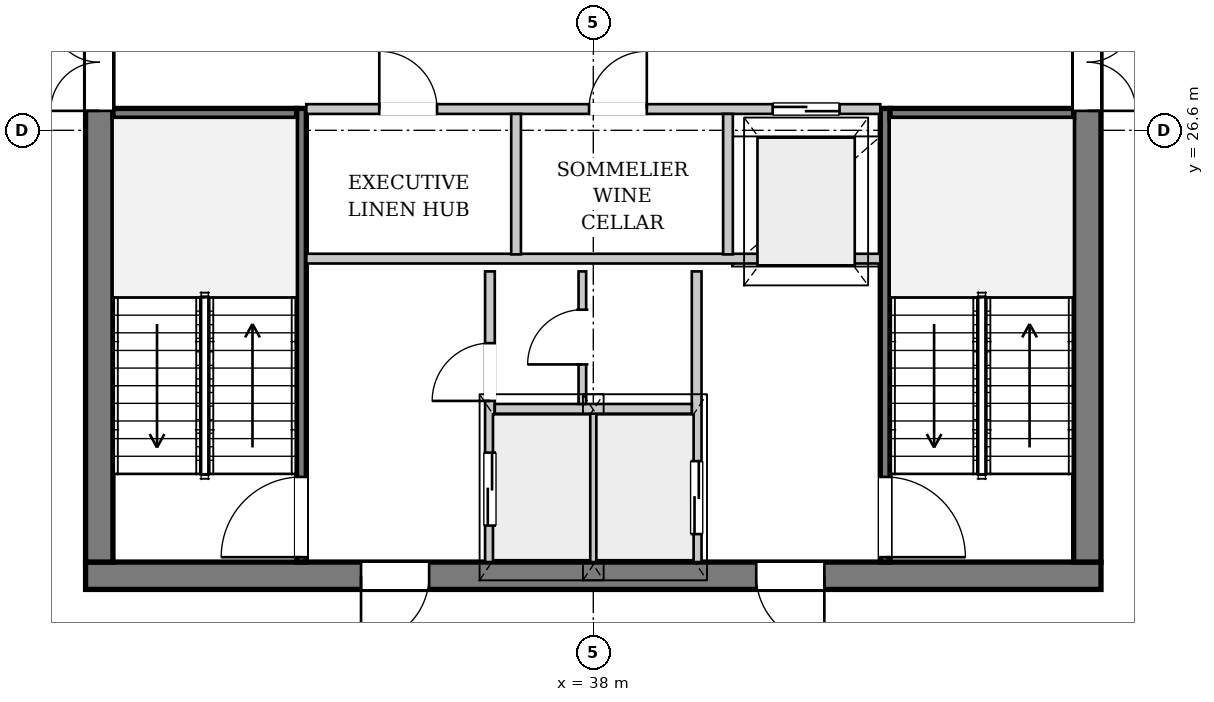
"""IFC4 building model, lengths in metres.
Left out: names, types, materials, properties, quantities, classifications, styles, units other than length and angle.
Written with IfcOpenShell. Run it as: python <this file> out.ifc"""

import sys

from ifc_helpers import new_model, si_unit, direction, frame, frame_2d, origin, place, context, subcontext, project, spatial, rectangle, extrude, source, transform, mapped, element, fill, save


model = new_model("IFC4")
c1 = context("Model", 3, precision=1e-05, world=origin(), true_north=direction((0.0, 1.0)))
c2 = subcontext(c1, "Body", "Model", "MODEL_VIEW")
j1 = project(units=[si_unit("LENGTHUNIT", "METRE"), si_unit("PLANEANGLEUNIT", "RADIAN")], contexts=[c1])
p1 = place(None, origin())
s1 = spatial("IfcSite", under=j1, at=p1, CompositionType="ELEMENT")
p2 = place(p1, origin())
s2 = spatial("IfcBuilding", under=s1, at=p2, CompositionType="ELEMENT")
p3 = place(p2, frame((0.0, 0.0, 274.1)))
s3 = spatial("IfcBuildingStorey", under=s2, at=p3, CompositionType="ELEMENT", Elevation=274.1)
p4 = place(p3, frame((51.126, 27.473, 0.0), z_axis=(0.0, 0.0, 1.0), x_axis=(-0.201040285464, -0.979582974342, 0.0)))
e1 = element("IfcWall", 1, at=p4, inside=s3, PredefinedType="SOLIDWALL", context=c2, shape_type="SweptSolid", body=[
    extrude(rectangle(XDim=22.119, YDim=0.32, at=frame_2d((11.06, 0.0))), origin(), (0.0, 0.0, 1.0), 2.812),
])
p5 = place(p4, frame((6.328, 0.0, 0.0)))
e2 = element("IfcOpeningElement", 2, at=p5, cuts=e1, PredefinedType="OPENING", context=c2, shape_type="SweptSolid", body=[
    extrude(rectangle(XDim=1.5, YDim=2.3, at=frame_2d((0.75, 1.15))), frame((0.0, 0.17, 0.0), z_axis=(0.0, -1.0, 0.0), x_axis=(1.0, 0.0, 0.0)), (0.0, 0.0, 1.0), 0.34),
])
p6 = place(p4, frame((15.268, 0.0, 0.342)))
e3 = element("IfcOpeningElement", 3, at=p6, cuts=e1, PredefinedType="OPENING", context=c2, shape_type="SweptSolid", body=[
    extrude(rectangle(XDim=2.6, YDim=2.35, at=frame_2d((1.3, 1.175))), frame((0.0, 0.17, 0.0), z_axis=(0.0, -1.0, 0.0), x_axis=(1.0, 0.0, 0.0)), (0.0, 0.0, 1.0), 0.34),
])
p7 = place(p3, frame((29.79, 13.028, 0.0), z_axis=(0.0, 0.0, 1.0), x_axis=(-0.78993873284, 0.613185778014, 0.0)))
e4 = element("IfcWall", 4, at=p7, inside=s3, PredefinedType="SOLIDWALL", context=c2, shape_type="SweptSolid", body=[
    extrude(rectangle(XDim=17.226, YDim=0.32, at=frame_2d((8.613, 0.0))), origin(), (0.0, 0.0, 1.0), 2.812),
])
p8 = place(p7, frame((6.362, 0.0, 0.0)))
e5 = element("IfcOpeningElement", 5, at=p8, cuts=e4, PredefinedType="OPENING", context=c2, shape_type="SweptSolid", body=[
    extrude(rectangle(XDim=1.5, YDim=2.3, at=frame_2d((0.75, 1.15))), frame((0.0, 0.17, 0.0), z_axis=(0.0, -1.0, 0.0), x_axis=(1.0, 0.0, 0.0)), (0.0, 0.0, 1.0), 0.34),
])
p9 = place(p7, frame((11.447, 0.0, 0.342)))
e6 = element("IfcOpeningElement", 6, at=p9, cuts=e4, PredefinedType="OPENING", context=c2, shape_type="SweptSolid", body=[
    extrude(rectangle(XDim=2.6, YDim=2.35, at=frame_2d((1.3, 1.175))), frame((0.0, 0.17, 0.0), z_axis=(0.0, -1.0, 0.0), x_axis=(1.0, 0.0, 0.0)), (0.0, 0.0, 1.0), 0.34),
])
p10 = place(p3, frame((16.162, 25.477, 0.0), z_axis=(0.0, 0.0, 1.0), x_axis=(0.777216193482, 0.629233651825, 0.0)))
e7 = element("IfcWall", 7, at=p10, inside=s3, PredefinedType="SOLIDWALL", context=c2, shape_type="SweptSolid", body=[
    extrude(rectangle(XDim=21.611, YDim=0.38, at=frame_2d((10.805, 0.0))), origin(), (0.0, 0.0, 1.0), 2.812),
])
p11 = place(p10, frame((4.951, 0.0, 0.442)))
e8 = element("IfcOpeningElement", 8, at=p11, cuts=e7, PredefinedType="OPENING", context=c2, shape_type="SweptSolid", body=[
    extrude(rectangle(XDim=2.2, YDim=2.25, at=frame_2d((1.1, 1.125))), frame((0.0, 0.2, 0.0), z_axis=(0.0, -1.0, 0.0), x_axis=(1.0, 0.0, 0.0)), (0.0, 0.0, 1.0), 0.4),
])
p12 = place(p10, frame((17.46, 0.0, 0.442)))
e9 = element("IfcOpeningElement", 9, at=p12, cuts=e7, PredefinedType="OPENING", context=c2, shape_type="SweptSolid", body=[
    extrude(rectangle(XDim=2.2, YDim=2.25, at=frame_2d((1.1, 1.125))), frame((0.0, 0.2, 0.0), z_axis=(0.0, -1.0, 0.0), x_axis=(1.0, 0.0, 0.0)), (0.0, 0.0, 1.0), 0.4),
])
p13 = place(p3, frame((46.35, 19.275, 0.0), z_axis=(0.0, 0.0, 1.0), x_axis=(-1.0, 0.0, 0.0)))
e10 = element("IfcWall", 10, at=p13, inside=s3, PredefinedType="SHEAR", context=c2, shape_type="SweptSolid", body=[
    extrude(rectangle(XDim=16.7, YDim=0.45, at=frame_2d((8.35, 0.0))), origin(), (0.0, 0.0, 1.0), 3.32),
])
p14 = place(p13, frame((4.55, 0.0, 0.0)))
e11 = element("IfcOpeningElement", 11, at=p14, cuts=e10, PredefinedType="OPENING", context=c2, shape_type="SweptSolid", body=[
    extrude(rectangle(XDim=1.12, YDim=2.25, at=frame_2d((0.56, 1.125))), frame((0.0, 0.235, 0.0), z_axis=(0.0, -1.0, 0.0), x_axis=(1.0, 0.0, 0.0)), (0.0, 0.0, 1.0), 0.47),
])
p15 = place(p13, frame((11.05, 0.0, 0.0)))
e12 = element("IfcOpeningElement", 12, at=p15, cuts=e10, PredefinedType="OPENING", context=c2, shape_type="SweptSolid", body=[
    extrude(rectangle(XDim=1.12, YDim=2.25, at=frame_2d((0.56, 1.125))), frame((0.0, 0.235, 0.0), z_axis=(0.0, -1.0, 0.0), x_axis=(1.0, 0.0, 0.0)), (0.0, 0.0, 1.0), 0.47),
])
p16 = place(p3, frame((29.875, 19.5, 0.0), z_axis=(0.0, 0.0, 1.0), x_axis=(0.0, 1.0, 0.0)))
e13 = element("IfcWall", 13, at=p16, inside=s3, PredefinedType="SHEAR", context=c2, shape_type="SweptSolid", body=[
    extrude(rectangle(XDim=14.2, YDim=0.45, at=frame_2d((7.1, 0.0))), origin(), (0.0, 0.0, 1.0), 3.32),
])
p17 = place(p16, frame((7.42, 0.0, 0.0)))
e14 = element("IfcOpeningElement", 14, at=p17, cuts=e13, PredefinedType="OPENING", context=c2, shape_type="SweptSolid", body=[
    extrude(rectangle(XDim=1.6, YDim=2.2, at=frame_2d((0.8, 1.1))), frame((0.0, 0.235, 0.0), z_axis=(0.0, -1.0, 0.0), x_axis=(1.0, 0.0, 0.0)), (0.0, 0.0, 1.0), 0.47),
])
p18 = place(p3, frame((46.125, 33.7, 0.0), z_axis=(0.0, 0.0, 1.0), x_axis=(0.0, -1.0, 0.0)))
e15 = element("IfcWall", 15, at=p18, inside=s3, PredefinedType="SHEAR", context=c2, shape_type="SweptSolid", body=[
    extrude(rectangle(XDim=14.2, YDim=0.45, at=frame_2d((7.1, 0.0))), origin(), (0.0, 0.0, 1.0), 3.32),
])
p19 = place(p18, frame((5.18, 0.0, 0.0)))
e16 = element("IfcOpeningElement", 16, at=p19, cuts=e15, PredefinedType="OPENING", context=c2, shape_type="SweptSolid", body=[
    extrude(rectangle(XDim=1.6, YDim=2.2, at=frame_2d((0.8, 1.1))), frame((0.0, 0.235, 0.0), z_axis=(0.0, -1.0, 0.0), x_axis=(1.0, 0.0, 0.0)), (0.0, 0.0, 1.0), 0.47),
])
p20 = place(p18, frame((2.05, 0.0, 0.0)))
e17 = element("IfcOpeningElement", 17, at=p20, cuts=e15, PredefinedType="OPENING", context=c2, shape_type="SweptSolid", body=[
    extrude(rectangle(XDim=0.95, YDim=2.1, at=frame_2d((0.475, 1.05))), frame((0.0, 0.235, 0.0), z_axis=(0.0, -1.0, 0.0), x_axis=(1.0, 0.0, 0.0)), (0.0, 0.0, 1.0), 0.47),
])
p21 = place(p3, frame((33.2, 19.5, 0.0), z_axis=(0.0, 0.0, 1.0), x_axis=(0.0, 1.0, 0.0)))
e18 = element("IfcWall", 18, at=p21, inside=s3, PredefinedType="PARTITIONING", context=c2, shape_type="SweptSolid", body=[
    extrude(rectangle(XDim=7.46, YDim=0.16, at=frame_2d((3.73, 0.0))), origin(), (0.0, 0.0, 1.0), 3.32),
])
p22 = place(p21, frame((0.08, 0.0, 0.0)))
e19 = element("IfcOpeningElement", 19, at=p22, cuts=e18, PredefinedType="OPENING", context=c2, shape_type="SweptSolid", body=[
    extrude(rectangle(XDim=1.32, YDim=2.2, at=frame_2d((0.66, 1.1))), frame((0.0, 0.09, 0.0), z_axis=(0.0, -1.0, 0.0), x_axis=(1.0, 0.0, 0.0)), (0.0, 0.0, 1.0), 0.18),
])
p23 = place(p3, frame((30.1, 26.88, 0.0), z_axis=(0.0, 0.0, 1.0), x_axis=(1.0, 0.0, 0.0)))
e20 = element("IfcWall", 20, at=p23, inside=s3, PredefinedType="PARTITIONING", context=c2, shape_type="SweptSolid", body=[
    extrude(rectangle(XDim=3.02, YDim=0.16, at=frame_2d((1.51, 0.0))), origin(), (0.0, 0.0, 1.0), 3.32),
])
p24 = place(p3, frame((42.8, 26.96, 0.0), z_axis=(0.0, 0.0, 1.0), x_axis=(0.0, -1.0, 0.0)))
e21 = element("IfcWall", 21, at=p24, inside=s3, PredefinedType="PARTITIONING", context=c2, shape_type="SweptSolid", body=[
    extrude(rectangle(XDim=7.46, YDim=0.16, at=frame_2d((3.73, 0.0))), origin(), (0.0, 0.0, 1.0), 3.32),
])
p25 = place(p24, frame((6.06, 0.0, 0.0)))
e22 = element("IfcOpeningElement", 22, at=p25, cuts=e21, PredefinedType="OPENING", context=c2, shape_type="SweptSolid", body=[
    extrude(rectangle(XDim=1.32, YDim=2.2, at=frame_2d((0.66, 1.1))), frame((0.0, 0.09, 0.0), z_axis=(0.0, -1.0, 0.0), x_axis=(1.0, 0.0, 0.0)), (0.0, 0.0, 1.0), 0.18),
])
p26 = place(p3, frame((42.88, 26.88, 0.0), z_axis=(0.0, 0.0, 1.0), x_axis=(1.0, 0.0, 0.0)))
e23 = element("IfcWall", 23, at=p26, inside=s3, PredefinedType="PARTITIONING", context=c2, shape_type="SweptSolid", body=[
    extrude(rectangle(XDim=3.02, YDim=0.16, at=frame_2d((1.51, 0.0))), origin(), (0.0, 0.0, 1.0), 3.32),
])
p27 = place(p3, frame((36.3, 19.5, 0.0), z_axis=(0.0, 0.0, 1.0), x_axis=(0.0, 1.0, 0.0)))
e24 = element("IfcWall", 24, at=p27, inside=s3, PredefinedType="PARTITIONING", context=c2, shape_type="SweptSolid", body=[
    extrude(rectangle(XDim=4.78, YDim=0.16, at=frame_2d((2.39, 0.0))), origin(), (0.0, 0.0, 1.0), 3.32),
])
p28 = place(p27, frame((0.6, 0.0, 0.0)))
e25 = element("IfcOpeningElement", 25, at=p28, cuts=e24, PredefinedType="OPENING", context=c2, shape_type="SweptSolid", body=[
    extrude(rectangle(XDim=1.2, YDim=2.2, at=frame_2d((0.6, 1.1))), frame((0.0, 0.09, 0.0), z_axis=(0.0, -1.0, 0.0), x_axis=(1.0, 0.0, 0.0)), (0.0, 0.0, 1.0), 0.18),
])
p29 = place(p27, frame((2.65, 0.0, 0.0)))
e26 = element("IfcOpeningElement", 26, at=p29, cuts=e24, PredefinedType="OPENING", context=c2, shape_type="SweptSolid", body=[
    extrude(rectangle(XDim=0.95, YDim=2.1, at=frame_2d((0.475, 1.05))), frame((0.0, 0.09, 0.0), z_axis=(0.0, -1.0, 0.0), x_axis=(1.0, 0.0, 0.0)), (0.0, 0.0, 1.0), 0.18),
])
p30 = place(p3, frame((39.7, 24.28, 0.0), z_axis=(0.0, 0.0, 1.0), x_axis=(0.0, -1.0, 0.0)))
e27 = element("IfcWall", 27, at=p30, inside=s3, PredefinedType="PARTITIONING", context=c2, shape_type="SweptSolid", body=[
    extrude(rectangle(XDim=4.78, YDim=0.16, at=frame_2d((2.39, 0.0))), origin(), (0.0, 0.0, 1.0), 3.32),
])
p31 = place(p30, frame((3.12, 0.0, 0.0)))
e28 = element("IfcOpeningElement", 28, at=p31, cuts=e27, PredefinedType="OPENING", context=c2, shape_type="SweptSolid", body=[
    extrude(rectangle(XDim=1.2, YDim=2.2, at=frame_2d((0.6, 1.1))), frame((0.0, 0.09, 0.0), z_axis=(0.0, -1.0, 0.0), x_axis=(1.0, 0.0, 0.0)), (0.0, 0.0, 1.0), 0.18),
])
p32 = place(p3, frame((38.0, 19.5, 0.0), z_axis=(0.0, 0.0, 1.0), x_axis=(0.0, 1.0, 0.0)))
e29 = element("IfcWall", 29, at=p32, inside=s3, PredefinedType="PARTITIONING", context=c2, shape_type="SweptSolid", body=[
    extrude(rectangle(XDim=2.46, YDim=0.125, at=frame_2d((1.23, 0.0))), origin(), (0.0, 0.0, 1.0), 3.32),
])
p33 = place(p3, frame((36.38, 22.02, 0.0), z_axis=(0.0, 0.0, 1.0), x_axis=(1.0, 0.0, 0.0)))
e30 = element("IfcWall", 30, at=p33, inside=s3, PredefinedType="PARTITIONING", context=c2, shape_type="SweptSolid", body=[
    extrude(rectangle(XDim=3.24, YDim=0.16, at=frame_2d((1.62, 0.0))), origin(), (0.0, 0.0, 1.0), 3.32),
])
p34 = place(p3, frame((33.28, 24.49, 0.0), z_axis=(0.0, 0.0, 1.0), x_axis=(1.0, 0.0, 0.0)))
e31 = element("IfcWall", 31, at=p34, inside=s3, PredefinedType="PARTITIONING", context=c2, shape_type="SweptSolid", body=[
    extrude(rectangle(XDim=9.44, YDim=0.16, at=frame_2d((4.72, 0.0))), origin(), (0.0, 0.0, 1.0), 3.32),
])
p35 = place(p3, frame((37.82, 22.1, 0.0), z_axis=(0.0, 0.0, 1.0), x_axis=(0.0, 1.0, 0.0)))
e32 = element("IfcWall", 32, at=p35, inside=s3, PredefinedType="PARTITIONING", context=c2, shape_type="SweptSolid", body=[
    extrude(rectangle(XDim=2.18, YDim=0.125, at=frame_2d((1.09, 0.0))), origin(), (0.0, 0.0, 1.0), 3.32),
])
p36 = place(p35, frame((0.65, 0.0, 0.0)))
e33 = element("IfcOpeningElement", 33, at=p36, cuts=e32, PredefinedType="OPENING", context=c2, shape_type="SweptSolid", body=[
    extrude(rectangle(XDim=0.9, YDim=2.1, at=frame_2d((0.45, 1.05))), frame((0.0, 0.073, 0.0), z_axis=(0.0, -1.0, 0.0), x_axis=(1.0, 0.0, 0.0)), (0.0, 0.0, 1.0), 0.145),
])
p37 = place(p3, frame((33.28, 26.95, 0.0), z_axis=(0.0, 0.0, 1.0), x_axis=(1.0, 0.0, 0.0)))
e34 = element("IfcWall", 34, at=p37, inside=s3, PredefinedType="PARTITIONING", context=c2, shape_type="SweptSolid", body=[
    extrude(rectangle(XDim=9.44, YDim=0.16, at=frame_2d((4.72, 0.0))), origin(), (0.0, 0.0, 1.0), 3.32),
])
p38 = place(p37, frame((1.2, 0.0, 0.0)))
e35 = element("IfcOpeningElement", 35, at=p38, cuts=e34, PredefinedType="OPENING", context=c2, shape_type="SweptSolid", body=[
    extrude(rectangle(XDim=0.95, YDim=2.1, at=frame_2d((0.475, 1.05))), frame((0.0, 0.09, 0.0), z_axis=(0.0, -1.0, 0.0), x_axis=(1.0, 0.0, 0.0)), (0.0, 0.0, 1.0), 0.18),
])
p39 = place(p37, frame((4.65, 0.0, 0.0)))
e36 = element("IfcOpeningElement", 36, at=p39, cuts=e34, PredefinedType="OPENING", context=c2, shape_type="SweptSolid", body=[
    extrude(rectangle(XDim=0.95, YDim=2.1, at=frame_2d((0.475, 1.05))), frame((0.0, 0.09, 0.0), z_axis=(0.0, -1.0, 0.0), x_axis=(1.0, 0.0, 0.0)), (0.0, 0.0, 1.0), 0.18),
])
p40 = place(p37, frame((7.67, 0.0, 0.0)))
e37 = element("IfcOpeningElement", 37, at=p40, cuts=e34, PredefinedType="OPENING", context=c2, shape_type="SweptSolid", body=[
    extrude(rectangle(XDim=1.1, YDim=2.2, at=frame_2d((0.55, 1.1))), frame((0.0, 0.09, 0.0), z_axis=(0.0, -1.0, 0.0), x_axis=(1.0, 0.0, 0.0)), (0.0, 0.0, 1.0), 0.18),
])
for number, where, z_axis, x_axis in (
    (38, (36.73, 24.56, 0.0), (0.0, 0.0, 1.0), (0.0, 1.0, 0.0)),
    (39, (40.215, 24.56, 0.0), (0.0, 0.0, 1.0), (0.0, 1.0, 0.0)),
):
    element("IfcWall", number, at=place(p3, frame(where, z_axis=z_axis, x_axis=x_axis)), inside=s3, PredefinedType="PARTITIONING", context=c2, shape_type="SweptSolid", body=[
        extrude(rectangle(XDim=2.31, YDim=0.16, at=frame_2d((1.155, 0.0))), origin(), (0.0, 0.0, 1.0), 3.32),
    ])
m1 = source(origin(), c2, "Body", "SweptSolid", [
    extrude(rectangle(XDim=1.12, YDim=2.25, at=frame_2d((0.56, 1.125))), frame((0.0, 0.025, 0.0), z_axis=(0.0, -1.0, 0.0), x_axis=(1.0, 0.0, 0.0)), (0.0, 0.0, 1.0), 0.05),
])
p41 = place(p14, origin())
e40 = element("IfcDoor", 40, at=p41, inside=s3, OperationType="SINGLE_SWING_LEFT", PredefinedType="DOOR", context=c2, shape_type="MappedRepresentation", body=[
    mapped(m1, transform((0.0, 0.0, 0.0), x_axis=(1.0, 0.0, 0.0), y_axis=(0.0, 1.0, 0.0), z_axis=(0.0, 0.0, 1.0), scale=1.0)),
])
fill(e11, e40)
p42 = place(p15, origin())
e41 = element("IfcDoor", 41, at=p42, inside=s3, OperationType="SINGLE_SWING_RIGHT", PredefinedType="DOOR", context=c2, shape_type="MappedRepresentation", body=[
    mapped(m1, transform((0.0, 0.0, 0.0), x_axis=(1.0, 0.0, 0.0), y_axis=(0.0, 1.0, 0.0), z_axis=(0.0, 0.0, 1.0), scale=1.0)),
])
fill(e12, e41)
m2 = source(origin(), c2, "Body", "SweptSolid", [
    extrude(rectangle(XDim=1.6, YDim=2.2, at=frame_2d((0.8, 1.1))), frame((0.0, 0.025, 0.0), z_axis=(0.0, -1.0, 0.0), x_axis=(1.0, 0.0, 0.0)), (0.0, 0.0, 1.0), 0.05),
])
p43 = place(p17, origin())
e42 = element("IfcDoor", 42, at=p43, inside=s3, OperationType="DOUBLE_DOOR_SINGLE_SWING", PredefinedType="DOOR", context=c2, shape_type="MappedRepresentation", body=[
    mapped(m2, transform((0.0, 0.0, 0.0), x_axis=(1.0, 0.0, 0.0), y_axis=(0.0, 1.0, 0.0), z_axis=(0.0, 0.0, 1.0), scale=1.0)),
])
fill(e14, e42)
p44 = place(p19, origin())
e43 = element("IfcDoor", 43, at=p44, inside=s3, OperationType="DOUBLE_DOOR_SINGLE_SWING", PredefinedType="DOOR", context=c2, shape_type="MappedRepresentation", body=[
    mapped(m2, transform((0.0, 0.0, 0.0), x_axis=(1.0, 0.0, 0.0), y_axis=(0.0, 1.0, 0.0), z_axis=(0.0, 0.0, 1.0), scale=1.0)),
])
fill(e16, e43)
m3 = source(origin(), c2, "Body", "SweptSolid", [
    extrude(rectangle(XDim=1.32, YDim=2.2, at=frame_2d((0.66, 1.1))), frame((0.0, 0.025, 0.0), z_axis=(0.0, -1.0, 0.0), x_axis=(1.0, 0.0, 0.0)), (0.0, 0.0, 1.0), 0.05),
])
p45 = place(p22, origin())
e44 = element("IfcDoor", 44, at=p45, inside=s3, OperationType="SINGLE_SWING_LEFT", PredefinedType="DOOR", context=c2, shape_type="MappedRepresentation", body=[
    mapped(m3, transform((0.0, 0.0, 0.0), x_axis=(1.0, 0.0, 0.0), y_axis=(0.0, 1.0, 0.0), z_axis=(0.0, 0.0, 1.0), scale=1.0)),
])
fill(e19, e44)
p46 = place(p25, origin())
e45 = element("IfcDoor", 45, at=p46, inside=s3, OperationType="SINGLE_SWING_RIGHT", PredefinedType="DOOR", context=c2, shape_type="MappedRepresentation", body=[
    mapped(m3, transform((0.0, 0.0, 0.0), x_axis=(1.0, 0.0, 0.0), y_axis=(0.0, 1.0, 0.0), z_axis=(0.0, 0.0, 1.0), scale=1.0)),
])
fill(e22, e45)
m4 = source(origin(), c2, "Body", "SweptSolid", [
    extrude(rectangle(XDim=1.2, YDim=2.2, at=frame_2d((0.6, 1.1))), frame((0.0, 0.025, 0.0), z_axis=(0.0, -1.0, 0.0), x_axis=(1.0, 0.0, 0.0)), (0.0, 0.0, 1.0), 0.05),
])
p47 = place(p28, origin())
e46 = element("IfcDoor", 46, at=p47, inside=s3, OperationType="DOUBLE_DOOR_SLIDING", PredefinedType="DOOR", context=c2, shape_type="MappedRepresentation", body=[
    mapped(m4, transform((0.0, 0.0, 0.0), x_axis=(1.0, 0.0, 0.0), y_axis=(0.0, 1.0, 0.0), z_axis=(0.0, 0.0, 1.0), scale=1.0)),
])
fill(e25, e46)
m5 = source(origin(), c2, "Body", "SweptSolid", [
    extrude(rectangle(XDim=0.95, YDim=2.1, at=frame_2d((0.475, 1.05))), frame((0.0, 0.025, 0.0), z_axis=(0.0, -1.0, 0.0), x_axis=(1.0, 0.0, 0.0)), (0.0, 0.0, 1.0), 0.05),
])
p48 = place(p29, origin())
e47 = element("IfcDoor", 47, at=p48, inside=s3, OperationType="SINGLE_SWING_LEFT", PredefinedType="DOOR", context=c2, shape_type="MappedRepresentation", body=[
    mapped(m5, transform((0.0, 0.0, 0.0), x_axis=(1.0, 0.0, 0.0), y_axis=(0.0, 1.0, 0.0), z_axis=(0.0, 0.0, 1.0), scale=1.0)),
])
fill(e26, e47)
m6 = source(origin(), c2, "Body", "SweptSolid", [
    extrude(rectangle(XDim=0.9, YDim=2.1, at=frame_2d((0.45, 1.05))), frame((0.0, 0.025, 0.0), z_axis=(0.0, -1.0, 0.0), x_axis=(1.0, 0.0, 0.0)), (0.0, 0.0, 1.0), 0.05),
])
p49 = place(p36, origin())
e48 = element("IfcDoor", 48, at=p49, inside=s3, OperationType="SINGLE_SWING_LEFT", PredefinedType="DOOR", context=c2, shape_type="MappedRepresentation", body=[
    mapped(m6, transform((0.0, 0.0, 0.0), x_axis=(1.0, 0.0, 0.0), y_axis=(0.0, 1.0, 0.0), z_axis=(0.0, 0.0, 1.0), scale=1.0)),
])
fill(e33, e48)
p50 = place(p31, origin())
e49 = element("IfcDoor", 49, at=p50, inside=s3, OperationType="DOUBLE_DOOR_SLIDING", PredefinedType="DOOR", context=c2, shape_type="MappedRepresentation", body=[
    mapped(m4, transform((0.0, 0.0, 0.0), x_axis=(1.0, 0.0, 0.0), y_axis=(0.0, 1.0, 0.0), z_axis=(0.0, 0.0, 1.0), scale=1.0)),
])
fill(e28, e49)
p51 = place(p38, origin())
e50 = element("IfcDoor", 50, at=p51, inside=s3, OperationType="SINGLE_SWING_LEFT", PredefinedType="DOOR", context=c2, shape_type="MappedRepresentation", body=[
    mapped(m5, transform((0.0, 0.0, 0.0), x_axis=(1.0, 0.0, 0.0), y_axis=(0.0, 1.0, 0.0), z_axis=(0.0, 0.0, 1.0), scale=1.0)),
])
fill(e35, e50)
p52 = place(p39, origin())
e51 = element("IfcDoor", 51, at=p52, inside=s3, OperationType="SINGLE_SWING_RIGHT", PredefinedType="DOOR", context=c2, shape_type="MappedRepresentation", body=[
    mapped(m5, transform((0.0, 0.0, 0.0), x_axis=(1.0, 0.0, 0.0), y_axis=(0.0, 1.0, 0.0), z_axis=(0.0, 0.0, 1.0), scale=1.0)),
])
fill(e36, e51)
m7 = source(origin(), c2, "Body", "SweptSolid", [
    extrude(rectangle(XDim=1.1, YDim=2.2, at=frame_2d((0.55, 1.1))), frame((0.0, 0.025, 0.0), z_axis=(0.0, -1.0, 0.0), x_axis=(1.0, 0.0, 0.0)), (0.0, 0.0, 1.0), 0.05),
])
p53 = place(p40, origin())
e52 = element("IfcDoor", 52, at=p53, inside=s3, OperationType="DOUBLE_DOOR_SLIDING", PredefinedType="DOOR", context=c2, shape_type="MappedRepresentation", body=[
    mapped(m7, transform((0.0, 0.0, 0.0), x_axis=(1.0, 0.0, 0.0), y_axis=(0.0, 1.0, 0.0), z_axis=(0.0, 0.0, 1.0), scale=1.0)),
])
fill(e37, e52)
save(model, sys.argv[1])
